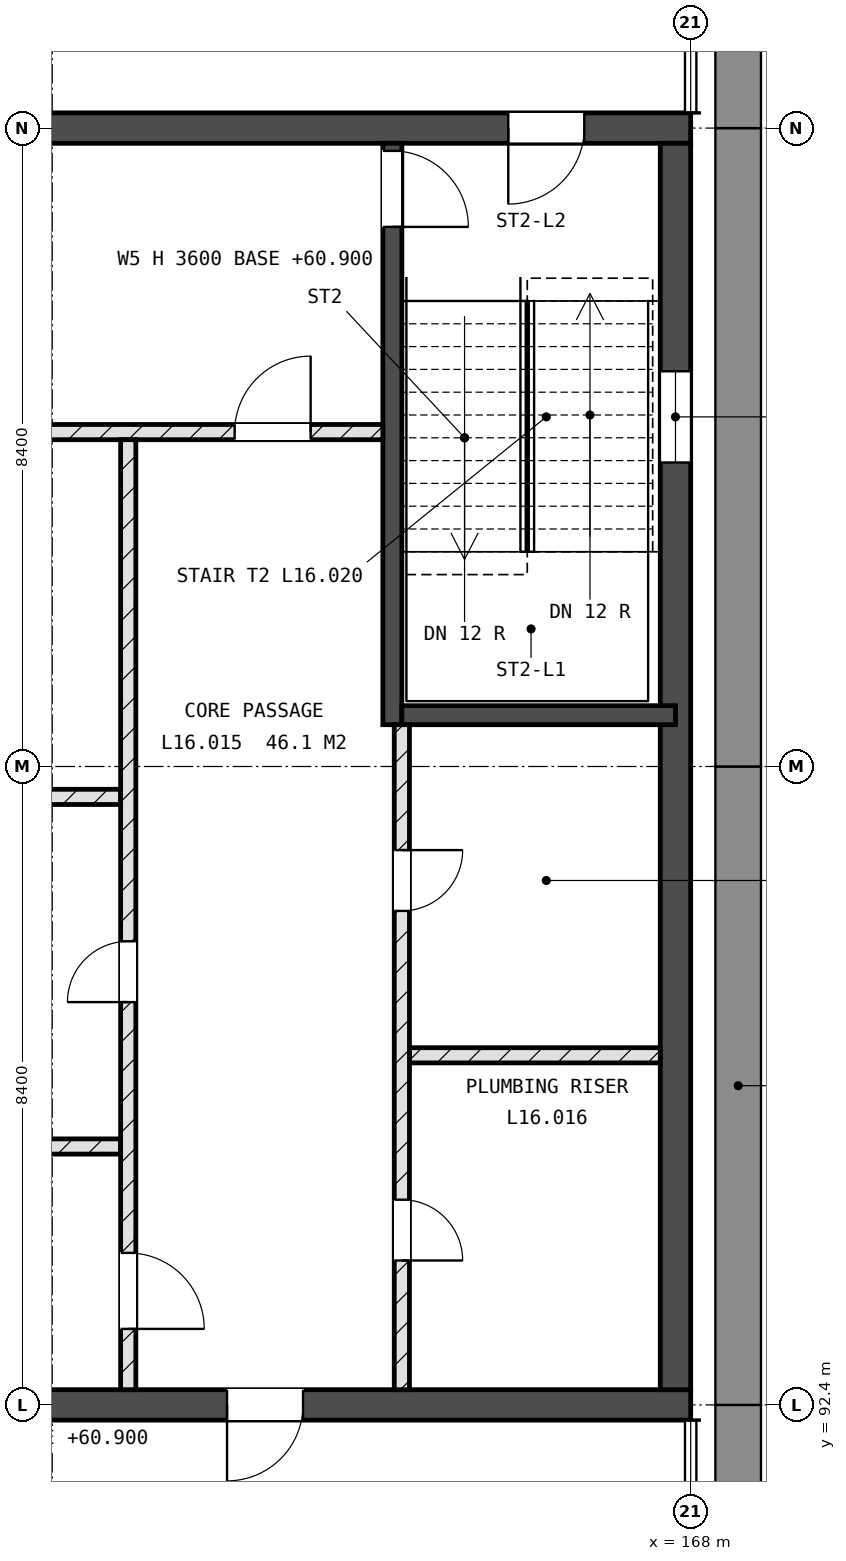
"""IFC4 building model, lengths in metres.
Left out: names, types, materials, properties, quantities, classifications, styles, units other than length and angle.
Written with IfcOpenShell. Run it as: python <this file> out.ifc"""

import sys

from ifc_helpers import new_model, si_unit, direction, frame, frame_2d, origin, place, context, subcontext, project, spatial, rectangle, extrude, element, fill, save


model = new_model("IFC4")
c1 = context("Model", 3, precision=1e-05, world=origin(), true_north=direction((0.0, 1.0)))
c2 = subcontext(c1, "Body", "Model", "MODEL_VIEW")
j1 = project(units=[si_unit("LENGTHUNIT", "METRE"), si_unit("PLANEANGLEUNIT", "RADIAN")], contexts=[c1])
p1 = place(None, origin())
s1 = spatial("IfcSite", under=j1, at=p1, CompositionType="ELEMENT")
p2 = place(p1, origin())
s2 = spatial("IfcBuilding", under=s1, at=p2, CompositionType="ELEMENT")
p3 = place(p2, frame((0.0, 0.0, 61.2)))
s3 = spatial("IfcBuildingStorey", under=s2, at=p3, CompositionType="ELEMENT", Elevation=61.2)
p4 = place(p3, frame((142.8, 92.4, -0.3), z_axis=(0.0, 0.0, 1.0), x_axis=(1.0, 0.0, 0.0)))
e1 = element("IfcWall", 1, at=p4, inside=s3, PredefinedType="SHEAR", context=c2, shape_type="SweptSolid", body=[
    extrude(rectangle(XDim=25.2, YDim=0.4, at=frame_2d((12.6, 0.0))), origin(), (0.0, 0.0, 1.0), 3.6),
])
p5 = place(p4, frame((1.4, 0.0, 0.3)))
e2 = element("IfcOpeningElement", 2, at=p5, cuts=e1, PredefinedType="OPENING", context=c2, shape_type="SweptSolid", body=[
    extrude(rectangle(XDim=1.0, YDim=2.1, at=frame_2d((0.5, 1.05))), frame((0.0, 0.21, 0.0), z_axis=(0.0, -1.0, 0.0), x_axis=(1.0, 0.0, 0.0)), (0.0, 0.0, 1.0), 0.42),
])
p6 = place(p4, frame((19.1, 0.0, 0.3)))
e3 = element("IfcOpeningElement", 3, at=p6, cuts=e1, PredefinedType="OPENING", context=c2, shape_type="SweptSolid", body=[
    extrude(rectangle(XDim=1.0, YDim=2.1, at=frame_2d((0.5, 1.05))), frame((0.0, 0.21, 0.0), z_axis=(0.0, -1.0, 0.0), x_axis=(1.0, 0.0, 0.0)), (0.0, 0.0, 1.0), 0.42),
])
p7 = place(p4, frame((10.4, 0.0, 0.3)))
e4 = element("IfcOpeningElement", 4, at=p7, cuts=e1, PredefinedType="OPENING", context=c2, shape_type="SweptSolid", body=[
    extrude(rectangle(XDim=1.0, YDim=2.1, at=frame_2d((0.5, 1.05))), frame((0.0, 0.21, 0.0), z_axis=(0.0, -1.0, 0.0), x_axis=(1.0, 0.0, 0.0)), (0.0, 0.0, 1.0), 0.42),
])
p8 = place(p3, frame((142.8, 109.2, -0.3), z_axis=(0.0, 0.0, 1.0), x_axis=(1.0, 0.0, 0.0)))
e5 = element("IfcWall", 5, at=p8, inside=s3, PredefinedType="SHEAR", context=c2, shape_type="SweptSolid", body=[
    extrude(rectangle(XDim=25.2, YDim=0.4, at=frame_2d((12.6, 0.0))), origin(), (0.0, 0.0, 1.0), 3.6),
])
p9 = place(p8, frame((22.8, 0.0, 0.3)))
e6 = element("IfcOpeningElement", 6, at=p9, cuts=e5, PredefinedType="OPENING", context=c2, shape_type="SweptSolid", body=[
    extrude(rectangle(XDim=1.0, YDim=2.1, at=frame_2d((0.5, 1.05))), frame((0.0, 0.21, 0.0), z_axis=(0.0, -1.0, 0.0), x_axis=(1.0, 0.0, 0.0)), (0.0, 0.0, 1.0), 0.42),
])
p10 = place(p8, frame((1.5, 0.0, 0.3)))
e7 = element("IfcOpeningElement", 7, at=p10, cuts=e5, PredefinedType="OPENING", context=c2, shape_type="SweptSolid", body=[
    extrude(rectangle(XDim=0.8, YDim=2.1, at=frame_2d((0.4, 1.05))), frame((0.0, 0.21, 0.0), z_axis=(0.0, -1.0, 0.0), x_axis=(1.0, 0.0, 0.0)), (0.0, 0.0, 1.0), 0.42),
])
p11 = place(p8, frame((13.4, 0.0, 0.3)))
e8 = element("IfcOpeningElement", 8, at=p11, cuts=e5, PredefinedType="OPENING", context=c2, shape_type="SweptSolid", body=[
    extrude(rectangle(XDim=1.0, YDim=2.1, at=frame_2d((0.5, 1.05))), frame((0.0, 0.21, 0.0), z_axis=(0.0, -1.0, 0.0), x_axis=(1.0, 0.0, 0.0)), (0.0, 0.0, 1.0), 0.42),
])
p12 = place(p3, frame((167.8, 92.6, -0.3), z_axis=(0.0, 0.0, 1.0), x_axis=(0.0, 1.0, 0.0)))
e9 = element("IfcWall", 9, at=p12, inside=s3, PredefinedType="SHEAR", context=c2, shape_type="SweptSolid", body=[
    extrude(rectangle(XDim=16.4, YDim=0.4, at=frame_2d((8.2, 0.0))), origin(), (0.0, 0.0, 1.0), 3.6),
])
p13 = place(p12, frame((12.2, 0.0, 1.9)))
e10 = element("IfcOpeningElement", 10, at=p13, cuts=e9, PredefinedType="OPENING", context=c2, shape_type="SweptSolid", body=[
    extrude(rectangle(XDim=1.2, YDim=0.9, at=frame_2d((0.6, 0.45))), frame((0.0, 0.21, 0.0), z_axis=(0.0, -1.0, 0.0), x_axis=(1.0, 0.0, 0.0)), (0.0, 0.0, 1.0), 0.42),
])
p14 = place(p3, frame((164.075, 101.35, -0.3), z_axis=(0.0, 0.0, 1.0), x_axis=(0.0, 1.0, 0.0)))
e11 = element("IfcWall", 11, at=p14, inside=s3, PredefinedType="SHEAR", context=c2, shape_type="SweptSolid", body=[
    extrude(rectangle(XDim=7.65, YDim=0.25, at=frame_2d((3.825, 0.0))), origin(), (0.0, 0.0, 1.0), 3.6),
])
p15 = place(p14, frame((6.55, 0.0, 0.3)))
e12 = element("IfcOpeningElement", 12, at=p15, cuts=e11, PredefinedType="OPENING", context=c2, shape_type="SweptSolid", body=[
    extrude(rectangle(XDim=1.0, YDim=2.1, at=frame_2d((0.5, 1.05))), frame((0.0, 0.135, 0.0), z_axis=(0.0, -1.0, 0.0), x_axis=(1.0, 0.0, 0.0)), (0.0, 0.0, 1.0), 0.27),
])
p16 = place(p3, frame((164.2, 101.475, -0.3), z_axis=(0.0, 0.0, 1.0), x_axis=(1.0, 0.0, 0.0)))
e13 = element("IfcWall", 13, at=p16, inside=s3, PredefinedType="SHEAR", context=c2, shape_type="SweptSolid", body=[
    extrude(rectangle(XDim=3.6, YDim=0.25, at=frame_2d((1.8, 0.0))), origin(), (0.0, 0.0, 1.0), 3.6),
])
p17 = place(p3, frame((158.25, 95.8, 0.0), z_axis=(0.0, 0.0, 1.0), x_axis=(1.0, 0.0, 0.0)))
e14 = element("IfcWall", 14, at=p17, inside=s3, PredefinedType="SOLIDWALL", context=c2, shape_type="SweptSolid", body=[
    extrude(rectangle(XDim=2.25, YDim=0.2, at=frame_2d((1.125, 0.0))), origin(), (0.0, 0.0, 1.0), 3.3),
])
p18 = place(p3, frame((164.3, 97.0, 0.0), z_axis=(0.0, 0.0, 1.0), x_axis=(1.0, 0.0, 0.0)))
e15 = element("IfcWall", 15, at=p18, inside=s3, PredefinedType="SOLIDWALL", context=c2, shape_type="SweptSolid", body=[
    extrude(rectangle(XDim=3.3, YDim=0.2, at=frame_2d((1.65, 0.0))), origin(), (0.0, 0.0, 1.0), 3.3),
])
p19 = place(p3, frame((146.5, 100.4, 0.0), z_axis=(0.0, 0.0, 1.0), x_axis=(1.0, 0.0, 0.0)))
e16 = element("IfcWall", 16, at=p19, inside=s3, PredefinedType="SOLIDWALL", context=c2, shape_type="SweptSolid", body=[
    extrude(rectangle(XDim=14.0, YDim=0.2, at=frame_2d((7.0, 0.0))), origin(), (0.0, 0.0, 1.0), 3.3),
])
p20 = place(p3, frame((143.2, 105.2, 0.0), z_axis=(0.0, 0.0, 1.0), x_axis=(1.0, 0.0, 0.0)))
e17 = element("IfcWall", 17, at=p20, inside=s3, PredefinedType="SOLIDWALL", context=c2, shape_type="SweptSolid", body=[
    extrude(rectangle(XDim=20.75, YDim=0.2, at=frame_2d((10.375, 0.0))), origin(), (0.0, 0.0, 1.0), 3.3),
])
p21 = place(p20, frame((11.5, 0.0, 0.0)))
e18 = element("IfcOpeningElement", 18, at=p21, cuts=e17, PredefinedType="OPENING", context=c2, shape_type="SweptSolid", body=[
    extrude(rectangle(XDim=0.8, YDim=2.1, at=frame_2d((0.4, 1.05))), frame((0.0, 0.11, 0.0), z_axis=(0.0, -1.0, 0.0), x_axis=(1.0, 0.0, 0.0)), (0.0, 0.0, 1.0), 0.22),
])
p22 = place(p20, frame((18.8, 0.0, 0.0)))
e19 = element("IfcOpeningElement", 19, at=p22, cuts=e17, PredefinedType="OPENING", context=c2, shape_type="SweptSolid", body=[
    extrude(rectangle(XDim=1.0, YDim=2.1, at=frame_2d((0.5, 1.05))), frame((0.0, 0.11, 0.0), z_axis=(0.0, -1.0, 0.0), x_axis=(1.0, 0.0, 0.0)), (0.0, 0.0, 1.0), 0.22),
])
p23 = place(p3, frame((160.6, 92.6, 0.0), z_axis=(0.0, 0.0, 1.0), x_axis=(0.0, 1.0, 0.0)))
e20 = element("IfcWall", 20, at=p23, inside=s3, PredefinedType="SOLIDWALL", context=c2, shape_type="SweptSolid", body=[
    extrude(rectangle(XDim=12.5, YDim=0.2, at=frame_2d((6.25, 0.0))), origin(), (0.0, 0.0, 1.0), 3.3),
])
p24 = place(p23, frame((5.1, 0.0, 0.0)))
e21 = element("IfcOpeningElement", 21, at=p24, cuts=e20, PredefinedType="OPENING", context=c2, shape_type="SweptSolid", body=[
    extrude(rectangle(XDim=0.8, YDim=2.1, at=frame_2d((0.4, 1.05))), frame((0.0, 0.11, 0.0), z_axis=(0.0, -1.0, 0.0), x_axis=(1.0, 0.0, 0.0)), (0.0, 0.0, 1.0), 0.22),
])
p25 = place(p23, frame((0.8, 0.0, 0.0)))
e22 = element("IfcOpeningElement", 22, at=p25, cuts=e20, PredefinedType="OPENING", context=c2, shape_type="SweptSolid", body=[
    extrude(rectangle(XDim=1.0, YDim=2.1, at=frame_2d((0.5, 1.05))), frame((0.0, 0.11, 0.0), z_axis=(0.0, -1.0, 0.0), x_axis=(1.0, 0.0, 0.0)), (0.0, 0.0, 1.0), 0.22),
])
p26 = place(p3, frame((164.2, 92.6, 0.0), z_axis=(0.0, 0.0, 1.0), x_axis=(0.0, 1.0, 0.0)))
e23 = element("IfcWall", 23, at=p26, inside=s3, PredefinedType="SOLIDWALL", context=c2, shape_type="SweptSolid", body=[
    extrude(rectangle(XDim=8.75, YDim=0.2, at=frame_2d((4.375, 0.0))), origin(), (0.0, 0.0, 1.0), 3.3),
])
p27 = place(p26, frame((1.7, 0.0, 0.0)))
e24 = element("IfcOpeningElement", 24, at=p27, cuts=e23, PredefinedType="OPENING", context=c2, shape_type="SweptSolid", body=[
    extrude(rectangle(XDim=0.8, YDim=2.1, at=frame_2d((0.4, 1.05))), frame((0.0, 0.11, 0.0), z_axis=(0.0, -1.0, 0.0), x_axis=(1.0, 0.0, 0.0)), (0.0, 0.0, 1.0), 0.22),
])
p28 = place(p26, frame((6.3, 0.0, 0.0)))
e25 = element("IfcOpeningElement", 25, at=p28, cuts=e23, PredefinedType="OPENING", context=c2, shape_type="SweptSolid", body=[
    extrude(rectangle(XDim=0.8, YDim=2.1, at=frame_2d((0.4, 1.05))), frame((0.0, 0.11, 0.0), z_axis=(0.0, -1.0, 0.0), x_axis=(1.0, 0.0, 0.0)), (0.0, 0.0, 1.0), 0.22),
])
p29 = place(p13, origin())
e26 = element("IfcWindow", 26, at=p29, inside=s3, PartitioningType="SINGLE_PANEL", PredefinedType="WINDOW", context=c2, shape_type="SweptSolid", body=[
    extrude(rectangle(XDim=1.2, YDim=0.9, at=frame_2d((0.6, 0.45))), frame((0.0, 0.03, 0.0), z_axis=(0.0, -1.0, 0.0), x_axis=(1.0, 0.0, 0.0)), (0.0, 0.0, 1.0), 0.06),
])
fill(e10, e26)
p30 = place(p15, origin())
e27 = element("IfcDoor", 27, at=p30, inside=s3, OperationType="SINGLE_SWING_LEFT", PredefinedType="DOOR", context=c2, shape_type="SweptSolid", body=[
    extrude(rectangle(XDim=1.0, YDim=2.1, at=frame_2d((0.5, 1.05))), frame((0.0, 0.025, 0.0), z_axis=(0.0, -1.0, 0.0), x_axis=(1.0, 0.0, 0.0)), (0.0, 0.0, 1.0), 0.05),
])
fill(e12, e27)
p31 = place(p9, origin())
e28 = element("IfcDoor", 28, at=p31, inside=s3, OperationType="SINGLE_SWING_LEFT", PredefinedType="DOOR", context=c2, shape_type="SweptSolid", body=[
    extrude(rectangle(XDim=1.0, YDim=2.1, at=frame_2d((0.5, 1.05))), frame((0.0, 0.025, 0.0), z_axis=(0.0, -1.0, 0.0), x_axis=(1.0, 0.0, 0.0)), (0.0, 0.0, 1.0), 0.05),
])
fill(e6, e28)
p32 = place(p27, origin())
e29 = element("IfcDoor", 29, at=p32, inside=s3, OperationType="SINGLE_SWING_LEFT", PredefinedType="DOOR", context=c2, shape_type="SweptSolid", body=[
    extrude(rectangle(XDim=0.8, YDim=2.1, at=frame_2d((0.4, 1.05))), frame((0.0, 0.025, 0.0), z_axis=(0.0, -1.0, 0.0), x_axis=(1.0, 0.0, 0.0)), (0.0, 0.0, 1.0), 0.05),
])
fill(e24, e29)
p33 = place(p28, origin())
e30 = element("IfcDoor", 30, at=p33, inside=s3, OperationType="SINGLE_SWING_RIGHT", PredefinedType="DOOR", context=c2, shape_type="SweptSolid", body=[
    extrude(rectangle(XDim=0.8, YDim=2.1, at=frame_2d((0.4, 1.05))), frame((0.0, 0.025, 0.0), z_axis=(0.0, -1.0, 0.0), x_axis=(1.0, 0.0, 0.0)), (0.0, 0.0, 1.0), 0.05),
])
fill(e25, e30)
p34 = place(p24, origin())
e31 = element("IfcDoor", 31, at=p34, inside=s3, OperationType="SINGLE_SWING_RIGHT", PredefinedType="DOOR", context=c2, shape_type="SweptSolid", body=[
    extrude(rectangle(XDim=0.8, YDim=2.1, at=frame_2d((0.4, 1.05))), frame((0.0, 0.025, 0.0), z_axis=(0.0, -1.0, 0.0), x_axis=(1.0, 0.0, 0.0)), (0.0, 0.0, 1.0), 0.05),
])
fill(e21, e31)
p35 = place(p6, origin())
e32 = element("IfcDoor", 32, at=p35, inside=s3, OperationType="SINGLE_SWING_LEFT", PredefinedType="DOOR", context=c2, shape_type="SweptSolid", body=[
    extrude(rectangle(XDim=1.0, YDim=2.1, at=frame_2d((0.5, 1.05))), frame((0.0, 0.025, 0.0), z_axis=(0.0, -1.0, 0.0), x_axis=(1.0, 0.0, 0.0)), (0.0, 0.0, 1.0), 0.05),
])
fill(e3, e32)
p36 = place(p25, origin())
e33 = element("IfcDoor", 33, at=p36, inside=s3, OperationType="SINGLE_SWING_LEFT", PredefinedType="DOOR", context=c2, shape_type="SweptSolid", body=[
    extrude(rectangle(XDim=1.0, YDim=2.1, at=frame_2d((0.5, 1.05))), frame((0.0, 0.025, 0.0), z_axis=(0.0, -1.0, 0.0), x_axis=(1.0, 0.0, 0.0)), (0.0, 0.0, 1.0), 0.05),
])
fill(e22, e33)
p37 = place(p22, origin())
e34 = element("IfcDoor", 34, at=p37, inside=s3, OperationType="SINGLE_SWING_LEFT", PredefinedType="DOOR", context=c2, shape_type="SweptSolid", body=[
    extrude(rectangle(XDim=1.0, YDim=2.1, at=frame_2d((0.5, 1.05))), frame((0.0, 0.025, 0.0), z_axis=(0.0, -1.0, 0.0), x_axis=(1.0, 0.0, 0.0)), (0.0, 0.0, 1.0), 0.05),
])
fill(e19, e34)
save(model, sys.argv[1])
